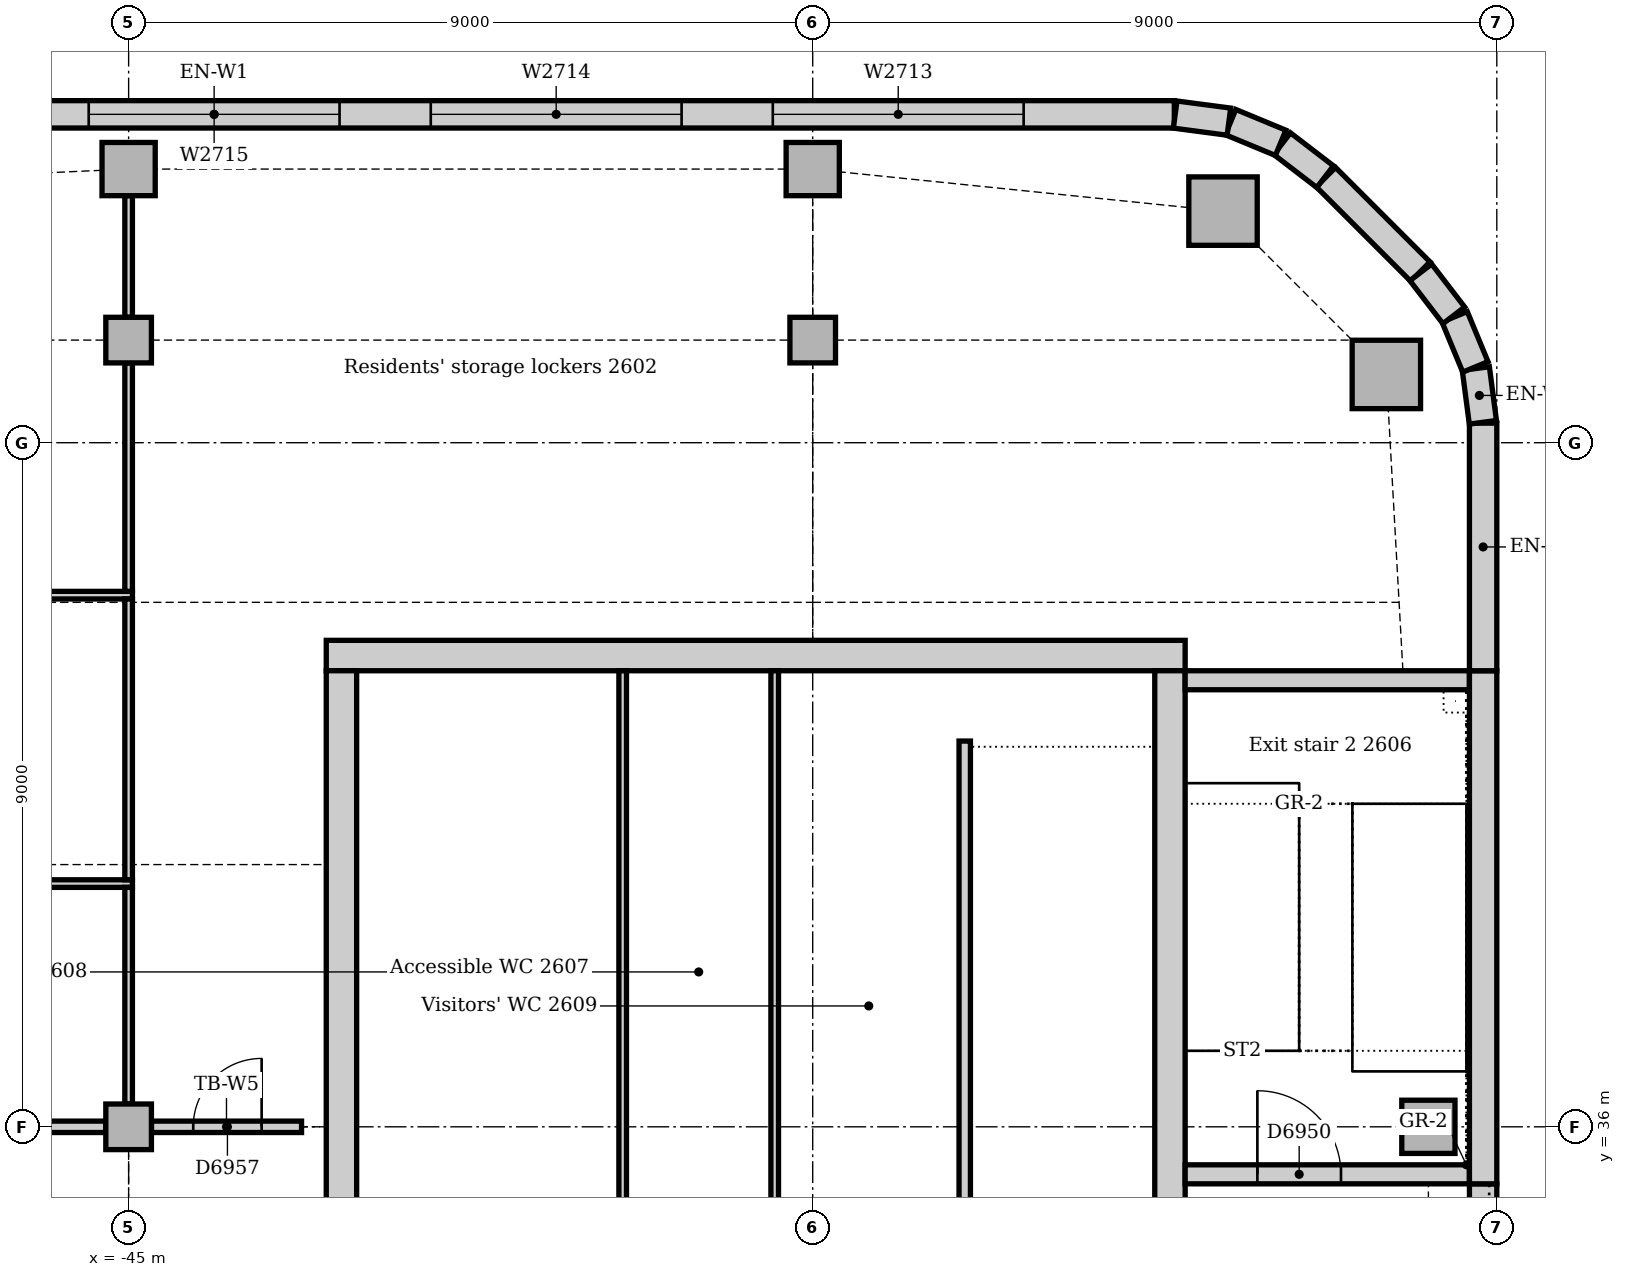
"""IFC4 building model, lengths in metres.
Left out: names, types, materials, properties, quantities, classifications, styles, units other than length and angle.
Written with IfcOpenShell. Run it as: python <this file> out.ifc"""

import sys

from ifc_helpers import new_model, si_unit, direction, frame, frame_2d, origin, origin_2d, place, context, subcontext, project, spatial, rectangle, extrude, element, fill, save


model = new_model("IFC4")
c1 = context("Model", 3, precision=1e-05, world=origin(), true_north=direction((0.0, 1.0)))
c2 = subcontext(c1, "Body", "Model", "MODEL_VIEW")
j1 = project(units=[si_unit("LENGTHUNIT", "METRE"), si_unit("PLANEANGLEUNIT", "RADIAN")], contexts=[c1])
p1 = place(None, origin())
s1 = spatial("IfcSite", under=j1, at=p1, CompositionType="ELEMENT")
p2 = place(p1, origin())
s2 = spatial("IfcBuilding", under=s1, at=p2, CompositionType="ELEMENT")
p3 = place(p2, frame((0.0, 0.0, 112.0)))
s3 = spatial("IfcBuildingStorey", under=s2, at=p3, CompositionType="ELEMENT", Elevation=112.0)
p4 = place(p3, frame((-31.1, 42.2, 0.0), z_axis=(0.0, 0.0, 1.0), x_axis=(-1.0, 0.0, 0.0)))
e1 = element("IfcWall", 1, at=p4, inside=s3, PredefinedType="SOLIDWALL", context=c2, shape_type="SweptSolid", body=[
    extrude(rectangle(XDim=11.3, YDim=0.4, at=frame_2d((5.65, 0.0))), origin(), (0.0, 0.0, 1.0), 4.0),
])
p5 = place(p3, frame((-31.3, 30.5, 0.0), z_axis=(0.0, 0.0, 1.0), x_axis=(0.0, 1.0, 0.0)))
e2 = element("IfcWall", 2, at=p5, inside=s3, PredefinedType="SOLIDWALL", context=c2, shape_type="SweptSolid", body=[
    extrude(rectangle(XDim=11.5, YDim=0.4, at=frame_2d((5.75, 0.0))), origin(), (0.0, 0.0, 1.0), 4.0),
])
p6 = place(p5, frame((0.85, 0.0, 0.0)))
e3 = element("IfcOpeningElement", 3, at=p6, cuts=e2, PredefinedType="OPENING", context=c2, shape_type="SweptSolid", body=[
    extrude(rectangle(XDim=1.8, YDim=2.1, at=frame_2d((0.9, 1.05))), frame((0.0, 0.21, 0.0), z_axis=(0.0, -1.0, 0.0), x_axis=(1.0, 0.0, 0.0)), (0.0, 0.0, 1.0), 0.42),
])
p7 = place(p3, frame((-42.2, 42.0, 0.0), z_axis=(0.0, 0.0, 1.0), x_axis=(0.0, -1.0, 0.0)))
e4 = element("IfcWall", 4, at=p7, inside=s3, PredefinedType="SOLIDWALL", context=c2, shape_type="SweptSolid", body=[
    extrude(rectangle(XDim=11.5, YDim=0.4, at=frame_2d((5.75, 0.0))), origin(), (0.0, 0.0, 1.0), 4.0),
])
p8 = place(p7, frame((8.85, 0.0, 0.0)))
e5 = element("IfcOpeningElement", 5, at=p8, cuts=e4, PredefinedType="OPENING", context=c2, shape_type="SweptSolid", body=[
    extrude(rectangle(XDim=1.8, YDim=2.1, at=frame_2d((0.9, 1.05))), frame((0.0, 0.21, 0.0), z_axis=(0.0, -1.0, 0.0), x_axis=(1.0, 0.0, 0.0)), (0.0, 0.0, 1.0), 0.42),
])
p9 = place(p3, frame((-31.1, 35.375, 0.0), z_axis=(0.0, 0.0, 1.0), x_axis=(1.0, 0.0, 0.0)))
e6 = element("IfcWall", 6, at=p9, inside=s3, PredefinedType="SOLIDWALL", context=c2, shape_type="SweptSolid", body=[
    extrude(rectangle(XDim=3.74, YDim=0.25, at=frame_2d((1.87, 0.0))), origin(), (0.0, 0.0, 1.0), 4.0),
])
p10 = place(p9, frame((0.95, 0.0, 0.0)))
e7 = element("IfcOpeningElement", 7, at=p10, cuts=e6, PredefinedType="OPENING", context=c2, shape_type="SweptSolid", body=[
    extrude(rectangle(XDim=1.1, YDim=2.1, at=frame_2d((0.55, 1.05))), frame((0.0, 0.135, 0.0), z_axis=(0.0, -1.0, 0.0), x_axis=(1.0, 0.0, 0.0)), (0.0, 0.0, 1.0), 0.27),
])
p11 = place(p3, frame((-27.36, 41.875, 0.0), z_axis=(0.0, 0.0, 1.0), x_axis=(-1.0, 0.0, 0.0)))
e8 = element("IfcWall", 8, at=p11, inside=s3, PredefinedType="SOLIDWALL", context=c2, shape_type="SweptSolid", body=[
    extrude(rectangle(XDim=3.74, YDim=0.25, at=frame_2d((1.87, 0.0))), origin(), (0.0, 0.0, 1.0), 4.0),
])
for number, where, z_axis, x_axis in (
    (9, (-28.453, 45.898, 0.0), (0.0, 0.0, 1.0), (1.0, 0.0, 0.0)),
    (10, (-30.602, 48.047, 0.0), (0.0, 0.0, 1.0), (1.0, 0.0, 0.0)),
):
    element("IfcColumn", number, at=place(p3, frame(where, z_axis=z_axis, x_axis=x_axis)), inside=s3, PredefinedType="COLUMN", context=c2, shape_type="SweptSolid", body=[
        extrude(rectangle(XDim=0.9, YDim=0.9, at=origin_2d()), origin(), (0.0, 0.0, 1.0), 3.85),
    ])
p12 = place(p3, frame((-27.9, 36.0, 0.0), z_axis=(0.0, 0.0, 1.0), x_axis=(1.0, 0.0, 0.0)))
e11 = element("IfcColumn", 11, at=p12, inside=s3, PredefinedType="COLUMN", context=c2, shape_type="SweptSolid", body=[
    extrude(rectangle(XDim=0.7, YDim=0.7, at=origin_2d()), origin(), (0.0, 0.0, 1.0), 4.0),
])
for number, where, z_axis, x_axis in (
    (12, (-45.0, 48.6, 0.0), (0.0, 0.0, 1.0), (1.0, 0.0, 0.0)),
    (13, (-36.0, 48.6, 0.0), (0.0, 0.0, 1.0), (1.0, 0.0, 0.0)),
):
    element("IfcColumn", number, at=place(p3, frame(where, z_axis=z_axis, x_axis=x_axis)), inside=s3, PredefinedType="COLUMN", context=c2, shape_type="SweptSolid", body=[
        extrude(rectangle(XDim=0.7, YDim=0.7, at=origin_2d()), origin(), (0.0, 0.0, 1.0), 3.85),
    ])
for number, where, z_axis, x_axis in (
    (14, (-45.0, 36.0, 0.0), (0.0, 0.0, 1.0), (1.0, 0.0, 0.0)),
    (15, (-45.0, 46.35, 0.0), (0.0, 0.0, 1.0), (1.0, 0.0, 0.0)),
    (16, (-36.0, 46.35, 0.0), (0.0, 0.0, 1.0), (1.0, 0.0, 0.0)),
):
    element("IfcColumn", number, at=place(p3, frame(where, z_axis=z_axis, x_axis=x_axis)), inside=s3, PredefinedType="COLUMN", context=c2, shape_type="SweptSolid", body=[
        extrude(rectangle(XDim=0.6, YDim=0.6, at=origin_2d()), origin(), (0.0, 0.0, 1.0), 3.85),
    ])
p13 = place(p3, frame((-27.18, 27.75, 0.0), z_axis=(0.0, 0.0, 1.0), x_axis=(0.0, 1.0, 0.0)))
e17 = element("IfcWall", 17, at=p13, inside=s3, PredefinedType="STANDARD", context=c2, shape_type="SweptSolid", body=[
    extrude(rectangle(XDim=7.5, YDim=0.36, at=frame_2d((3.75, 0.0))), origin(), (0.0, 0.0, 1.0), 3.85),
])
p14 = place(p13, frame((2.85, 0.0, 1.2)))
e18 = element("IfcOpeningElement", 18, at=p14, cuts=e17, PredefinedType="OPENING", context=c2, shape_type="SweptSolid", body=[
    extrude(rectangle(XDim=1.8, YDim=1.2, at=frame_2d((0.9, 0.6))), frame((0.0, 0.19, 0.0), z_axis=(0.0, -1.0, 0.0), x_axis=(1.0, 0.0, 0.0)), (0.0, 0.0, 1.0), 0.38),
])
p15 = place(p3, frame((-27.18, 35.25, 0.0), z_axis=(0.0, 0.0, 1.0), x_axis=(0.0, 1.0, 0.0)))
e19 = element("IfcWall", 19, at=p15, inside=s3, PredefinedType="STANDARD", context=c2, shape_type="SweptSolid", body=[
    extrude(rectangle(XDim=6.75, YDim=0.36, at=frame_2d((3.375, 0.0))), origin(), (0.0, 0.0, 1.0), 3.85),
])
p16 = place(p3, frame((-27.18, 42.0, 0.0), z_axis=(0.0, 0.0, 1.0), x_axis=(0.0, 1.0, 0.0)))
e20 = element("IfcWall", 20, at=p16, inside=s3, PredefinedType="STANDARD", context=c2, shape_type="SweptSolid", body=[
    extrude(rectangle(XDim=3.257, YDim=0.36, at=frame_2d((1.629, 0.0))), origin(), (0.0, 0.0, 1.0), 3.85),
])
p17 = place(p3, frame((-28.006, 47.251, 0.0), z_axis=(0.0, 0.0, 1.0), x_axis=(-0.707106781187, 0.707106781187, 0.0)))
e21 = element("IfcWall", 21, at=p17, inside=s3, PredefinedType="STANDARD", context=c2, shape_type="SweptSolid", body=[
    extrude(rectangle(XDim=1.757, YDim=0.36, at=frame_2d((0.879, 0.0))), origin(), (0.0, 0.0, 1.0), 3.85),
])
p18 = place(p3, frame((-31.243, 49.32, 0.0), z_axis=(0.0, 0.0, 1.0), x_axis=(-1.0, 0.0, 0.0)))
e22 = element("IfcWall", 22, at=p18, inside=s3, PredefinedType="STANDARD", context=c2, shape_type="SweptSolid", body=[
    extrude(rectangle(XDim=25.265, YDim=0.36, at=frame_2d((12.632, 0.0))), origin(), (0.0, 0.0, 1.0), 3.85),
])
p19 = place(p18, frame((1.982, 0.0, 0.9)))
e23 = element("IfcOpeningElement", 23, at=p19, cuts=e22, PredefinedType="OPENING", context=c2, shape_type="SweptSolid", body=[
    extrude(rectangle(XDim=3.3, YDim=1.6, at=frame_2d((1.65, 0.8))), frame((0.0, 0.19, 0.0), z_axis=(0.0, -1.0, 0.0), x_axis=(1.0, 0.0, 0.0)), (0.0, 0.0, 1.0), 0.38),
])
p20 = place(p18, frame((6.482, 0.0, 0.9)))
e24 = element("IfcOpeningElement", 24, at=p20, cuts=e22, PredefinedType="OPENING", context=c2, shape_type="SweptSolid", body=[
    extrude(rectangle(XDim=3.3, YDim=1.6, at=frame_2d((1.65, 0.8))), frame((0.0, 0.19, 0.0), z_axis=(0.0, -1.0, 0.0), x_axis=(1.0, 0.0, 0.0)), (0.0, 0.0, 1.0), 0.38),
])
p21 = place(p18, frame((10.982, 0.0, 0.9)))
e25 = element("IfcOpeningElement", 25, at=p21, cuts=e22, PredefinedType="OPENING", context=c2, shape_type="SweptSolid", body=[
    extrude(rectangle(XDim=3.3, YDim=1.6, at=frame_2d((1.65, 0.8))), frame((0.0, 0.19, 0.0), z_axis=(0.0, -1.0, 0.0), x_axis=(1.0, 0.0, 0.0)), (0.0, 0.0, 1.0), 0.38),
])
p22 = place(p18, frame((15.482, 0.0, 0.9)))
e26 = element("IfcOpeningElement", 26, at=p22, cuts=e22, PredefinedType="OPENING", context=c2, shape_type="SweptSolid", body=[
    extrude(rectangle(XDim=3.3, YDim=1.6, at=frame_2d((1.65, 0.8))), frame((0.0, 0.19, 0.0), z_axis=(0.0, -1.0, 0.0), x_axis=(1.0, 0.0, 0.0)), (0.0, 0.0, 1.0), 0.38),
])
p23 = place(p18, frame((19.982, 0.0, 0.9)))
e27 = element("IfcOpeningElement", 27, at=p23, cuts=e22, PredefinedType="OPENING", context=c2, shape_type="SweptSolid", body=[
    extrude(rectangle(XDim=3.3, YDim=1.6, at=frame_2d((1.65, 0.8))), frame((0.0, 0.19, 0.0), z_axis=(0.0, -1.0, 0.0), x_axis=(1.0, 0.0, 0.0)), (0.0, 0.0, 1.0), 0.38),
])
for number, where, z_axis, x_axis in (
    (28, (-27.183, 45.269, 0.0), (0.0, 0.0, 1.0), (-0.131, 0.991, 0.0)),
    (29, (-27.282, 45.997, 0.0), (0.0, 0.0, 1.0), (-0.383, 0.924, 0.0)),
):
    element("IfcWall", number, at=place(p3, frame(where, z_axis=z_axis, x_axis=x_axis)), inside=s3, PredefinedType="STANDARD", context=c2, shape_type="SweptSolid", body=[
        extrude(rectangle(XDim=0.713, YDim=0.36, at=frame_2d((0.356, 0.0))), origin(), (0.0, 0.0, 1.0), 3.85),
    ])
for number, where, z_axis, x_axis in (
    (30, (-27.566, 46.675, 0.0), (0.0, 0.0, 1.0), (-0.609, 0.793, 0.0)),
    (31, (-29.259, 48.5, 0.0), (0.0, 0.0, 1.0), (-0.793, 0.609, 0.0)),
):
    element("IfcWall", number, at=place(p3, frame(where, z_axis=z_axis, x_axis=x_axis)), inside=s3, PredefinedType="STANDARD", context=c2, shape_type="SweptSolid", body=[
        extrude(rectangle(XDim=0.713, YDim=0.36, at=frame_2d((0.357, 0.0))), origin(), (0.0, 0.0, 1.0), 3.85),
    ])
for number, where, z_axis, x_axis in (
    (32, (-29.844, 48.945, 0.0), (0.0, 0.0, 1.0), (-0.924, 0.383, 0.0)),
    (33, (-30.524, 49.224, 0.0), (0.0, 0.0, 1.0), (-0.991, 0.131, 0.0)),
):
    element("IfcWall", number, at=place(p3, frame(where, z_axis=z_axis, x_axis=x_axis)), inside=s3, PredefinedType="STANDARD", context=c2, shape_type="SweptSolid", body=[
        extrude(rectangle(XDim=0.713, YDim=0.36, at=frame_2d((0.356, 0.0))), origin(), (0.0, 0.0, 1.0), 3.85),
    ])
p24 = place(p3, frame((-34.0, 41.075, 0.0), z_axis=(0.0, 0.0, 1.0), x_axis=(0.0, -1.0, 0.0)))
e34 = element("IfcWall", 34, at=p24, inside=s3, PredefinedType="SOLIDWALL", context=c2, shape_type="SweptSolid", body=[
    extrude(rectangle(XDim=7.0, YDim=0.15, at=frame_2d((3.5, 0.0))), origin(), (0.0, 0.0, 1.0), 4.0),
])
for number, where, z_axis, x_axis in (
    (35, (-38.5, 34.075, 0.0), (0.0, 0.0, 1.0), (0.0, 1.0, 0.0)),
    (36, (-36.5, 34.075, 0.0), (0.0, 0.0, 1.0), (0.0, 1.0, 0.0)),
):
    element("IfcWall", number, at=place(p3, frame(where, z_axis=z_axis, x_axis=x_axis)), inside=s3, PredefinedType="PARTITIONING", context=c2, shape_type="SweptSolid", body=[
        extrude(rectangle(XDim=7.925, YDim=0.1, at=frame_2d((3.962, 0.0))), origin(), (0.0, 0.0, 1.0), 3.85),
    ])
p25 = place(p3, frame((-44.7, 36.0, 0.0), z_axis=(0.0, 0.0, 1.0), x_axis=(1.0, 0.0, 0.0)))
e37 = element("IfcWall", 37, at=p25, inside=s3, PredefinedType="PARTITIONING", context=c2, shape_type="SweptSolid", body=[
    extrude(rectangle(XDim=1.975, YDim=0.15, at=frame_2d((0.988, 0.0))), origin(), (0.0, 0.0, 1.0), 3.602),
])
p26 = place(p25, frame((0.55, 0.0, 0.0)))
e38 = element("IfcOpeningElement", 38, at=p26, cuts=e37, PredefinedType="OPENING", context=c2, shape_type="SweptSolid", body=[
    extrude(rectangle(XDim=0.9, YDim=2.1, at=frame_2d((0.45, 1.05))), frame((0.0, 0.085, 0.0), z_axis=(0.0, -1.0, 0.0), x_axis=(1.0, 0.0, 0.0)), (0.0, 0.0, 1.0), 0.17),
])
p27 = place(p3, frame((-53.7, 36.0, 0.0), z_axis=(0.0, 0.0, 1.0), x_axis=(1.0, 0.0, 0.0)))
e39 = element("IfcWall", 39, at=p27, inside=s3, PredefinedType="PARTITIONING", context=c2, shape_type="SweptSolid", body=[
    extrude(rectangle(XDim=8.4, YDim=0.15, at=frame_2d((4.2, 0.0))), origin(), (0.0, 0.0, 1.0), 3.262),
])
p28 = place(p27, frame((0.3, 0.0, 0.0)))
e40 = element("IfcOpeningElement", 40, at=p28, cuts=e39, PredefinedType="OPENING", context=c2, shape_type="SweptSolid", body=[
    extrude(rectangle(XDim=1.0, YDim=2.1, at=frame_2d((0.5, 1.05))), frame((0.0, 0.085, 0.0), z_axis=(0.0, -1.0, 0.0), x_axis=(1.0, 0.0, 0.0)), (0.0, 0.0, 1.0), 0.17),
])
p29 = place(p3, frame((-60.39, 39.2, 0.0), z_axis=(0.0, 0.0, 1.0), x_axis=(1.0, 0.0, 0.0)))
e41 = element("IfcWall", 41, at=p29, inside=s3, PredefinedType="PARTITIONING", context=c2, shape_type="SweptSolid", body=[
    extrude(rectangle(XDim=15.44, YDim=0.1, at=frame_2d((7.72, 0.0))), origin(), (0.0, 0.0, 1.0), 3.85),
])
p30 = place(p29, frame((6.021, 0.0, 0.0)))
e42 = element("IfcOpeningElement", 42, at=p30, cuts=e41, PredefinedType="OPENING", context=c2, shape_type="SweptSolid", body=[
    extrude(rectangle(XDim=0.9, YDim=2.1, at=frame_2d((0.45, 1.05))), frame((0.0, 0.06, 0.0), z_axis=(0.0, -1.0, 0.0), x_axis=(1.0, 0.0, 0.0)), (0.0, 0.0, 1.0), 0.12),
])
p31 = place(p3, frame((-60.39, 42.994, 0.0), z_axis=(0.0, 0.0, 1.0), x_axis=(1.0, 0.0, 0.0)))
e43 = element("IfcWall", 43, at=p31, inside=s3, PredefinedType="PARTITIONING", context=c2, shape_type="SweptSolid", body=[
    extrude(rectangle(XDim=15.44, YDim=0.1, at=frame_2d((7.72, 0.0))), origin(), (0.0, 0.0, 1.0), 3.4),
])
p32 = place(p31, frame((4.5, 0.0, 0.0)))
e44 = element("IfcOpeningElement", 44, at=p32, cuts=e43, PredefinedType="OPENING", context=c2, shape_type="SweptSolid", body=[
    extrude(rectangle(XDim=0.9, YDim=2.1, at=frame_2d((0.45, 1.05))), frame((0.0, 0.06, 0.0), z_axis=(0.0, -1.0, 0.0), x_axis=(1.0, 0.0, 0.0)), (0.0, 0.0, 1.0), 0.12),
])
p33 = place(p31, frame((12.06, 0.0, 0.0)))
e45 = element("IfcOpeningElement", 45, at=p33, cuts=e43, PredefinedType="OPENING", context=c2, shape_type="SweptSolid", body=[
    extrude(rectangle(XDim=0.9, YDim=2.1, at=frame_2d((0.45, 1.05))), frame((0.0, 0.06, 0.0), z_axis=(0.0, -1.0, 0.0), x_axis=(1.0, 0.0, 0.0)), (0.0, 0.0, 1.0), 0.12),
])
p34 = place(p3, frame((-45.0, 43.044, 0.0), z_axis=(0.0, 0.0, 1.0), x_axis=(0.0, 1.0, 0.0)))
e46 = element("IfcWall", 46, at=p34, inside=s3, PredefinedType="PARTITIONING", context=c2, shape_type="SweptSolid", body=[
    extrude(rectangle(XDim=3.006, YDim=0.1, at=frame_2d((1.503, 0.0))), origin(), (0.0, 0.0, 1.0), 3.362),
])
p35 = place(p3, frame((-45.0, 39.25, 0.0), z_axis=(0.0, 0.0, 1.0), x_axis=(0.0, 1.0, 0.0)))
e47 = element("IfcWall", 47, at=p35, inside=s3, PredefinedType="PARTITIONING", context=c2, shape_type="SweptSolid", body=[
    extrude(rectangle(XDim=3.694, YDim=0.1, at=frame_2d((1.847, 0.0))), origin(), (0.0, 0.0, 1.0), 3.362),
])
p36 = place(p3, frame((-45.0, 36.3, 0.0), z_axis=(0.0, 0.0, 1.0), x_axis=(0.0, 1.0, 0.0)))
e48 = element("IfcWall", 48, at=p36, inside=s3, PredefinedType="PARTITIONING", context=c2, shape_type="SweptSolid", body=[
    extrude(rectangle(XDim=2.85, YDim=0.1, at=frame_2d((1.425, 0.0))), origin(), (0.0, 0.0, 1.0), 3.362),
])
p37 = place(p3, frame((-45.0, 46.65, 0.0), z_axis=(0.0, 0.0, 1.0), x_axis=(0.0, 1.0, 0.0)))
e49 = element("IfcWall", 49, at=p37, inside=s3, PredefinedType="PARTITIONING", context=c2, shape_type="SweptSolid", body=[
    extrude(rectangle(XDim=1.6, YDim=0.1, at=frame_2d((0.8, 0.0))), origin(), (0.0, 0.0, 1.0), 3.652),
])
p38 = place(p19, origin())
e50 = element("IfcWindow", 50, at=p38, inside=s3, PartitioningType="SINGLE_PANEL", PredefinedType="WINDOW", context=c2, shape_type="SweptSolid", body=[
    extrude(rectangle(XDim=3.3, YDim=1.6, at=frame_2d((1.65, 0.8))), frame((0.0, 0.13, 0.0), z_axis=(0.0, -1.0, 0.0), x_axis=(1.0, 0.0, 0.0)), (0.0, 0.0, 1.0), 0.06),
])
fill(e23, e50)
p39 = place(p20, origin())
e51 = element("IfcWindow", 51, at=p39, inside=s3, PartitioningType="SINGLE_PANEL", PredefinedType="WINDOW", context=c2, shape_type="SweptSolid", body=[
    extrude(rectangle(XDim=3.3, YDim=1.6, at=frame_2d((1.65, 0.8))), frame((0.0, 0.13, 0.0), z_axis=(0.0, -1.0, 0.0), x_axis=(1.0, 0.0, 0.0)), (0.0, 0.0, 1.0), 0.06),
])
fill(e24, e51)
p40 = place(p21, origin())
e52 = element("IfcWindow", 52, at=p40, inside=s3, PartitioningType="SINGLE_PANEL", PredefinedType="WINDOW", context=c2, shape_type="SweptSolid", body=[
    extrude(rectangle(XDim=3.3, YDim=1.6, at=frame_2d((1.65, 0.8))), frame((0.0, 0.13, 0.0), z_axis=(0.0, -1.0, 0.0), x_axis=(1.0, 0.0, 0.0)), (0.0, 0.0, 1.0), 0.06),
])
fill(e25, e52)
p41 = place(p10, origin())
e53 = element("IfcDoor", 53, at=p41, inside=s3, OperationType="SINGLE_SWING_LEFT", PredefinedType="DOOR", context=c2, shape_type="SweptSolid", body=[
    extrude(rectangle(XDim=1.1, YDim=2.1, at=frame_2d((0.55, 1.05))), frame((0.0, 0.025, 0.0), z_axis=(0.0, -1.0, 0.0), x_axis=(1.0, 0.0, 0.0)), (0.0, 0.0, 1.0), 0.05),
])
fill(e7, e53)
p42 = place(p26, origin())
e54 = element("IfcDoor", 54, at=p42, inside=s3, OperationType="SINGLE_SWING_RIGHT", PredefinedType="DOOR", context=c2, shape_type="SweptSolid", body=[
    extrude(rectangle(XDim=0.9, YDim=2.1, at=frame_2d((0.45, 1.05))), frame((0.0, 0.025, 0.0), z_axis=(0.0, -1.0, 0.0), x_axis=(1.0, 0.0, 0.0)), (0.0, 0.0, 1.0), 0.05),
])
fill(e38, e54)
save(model, sys.argv[1])
